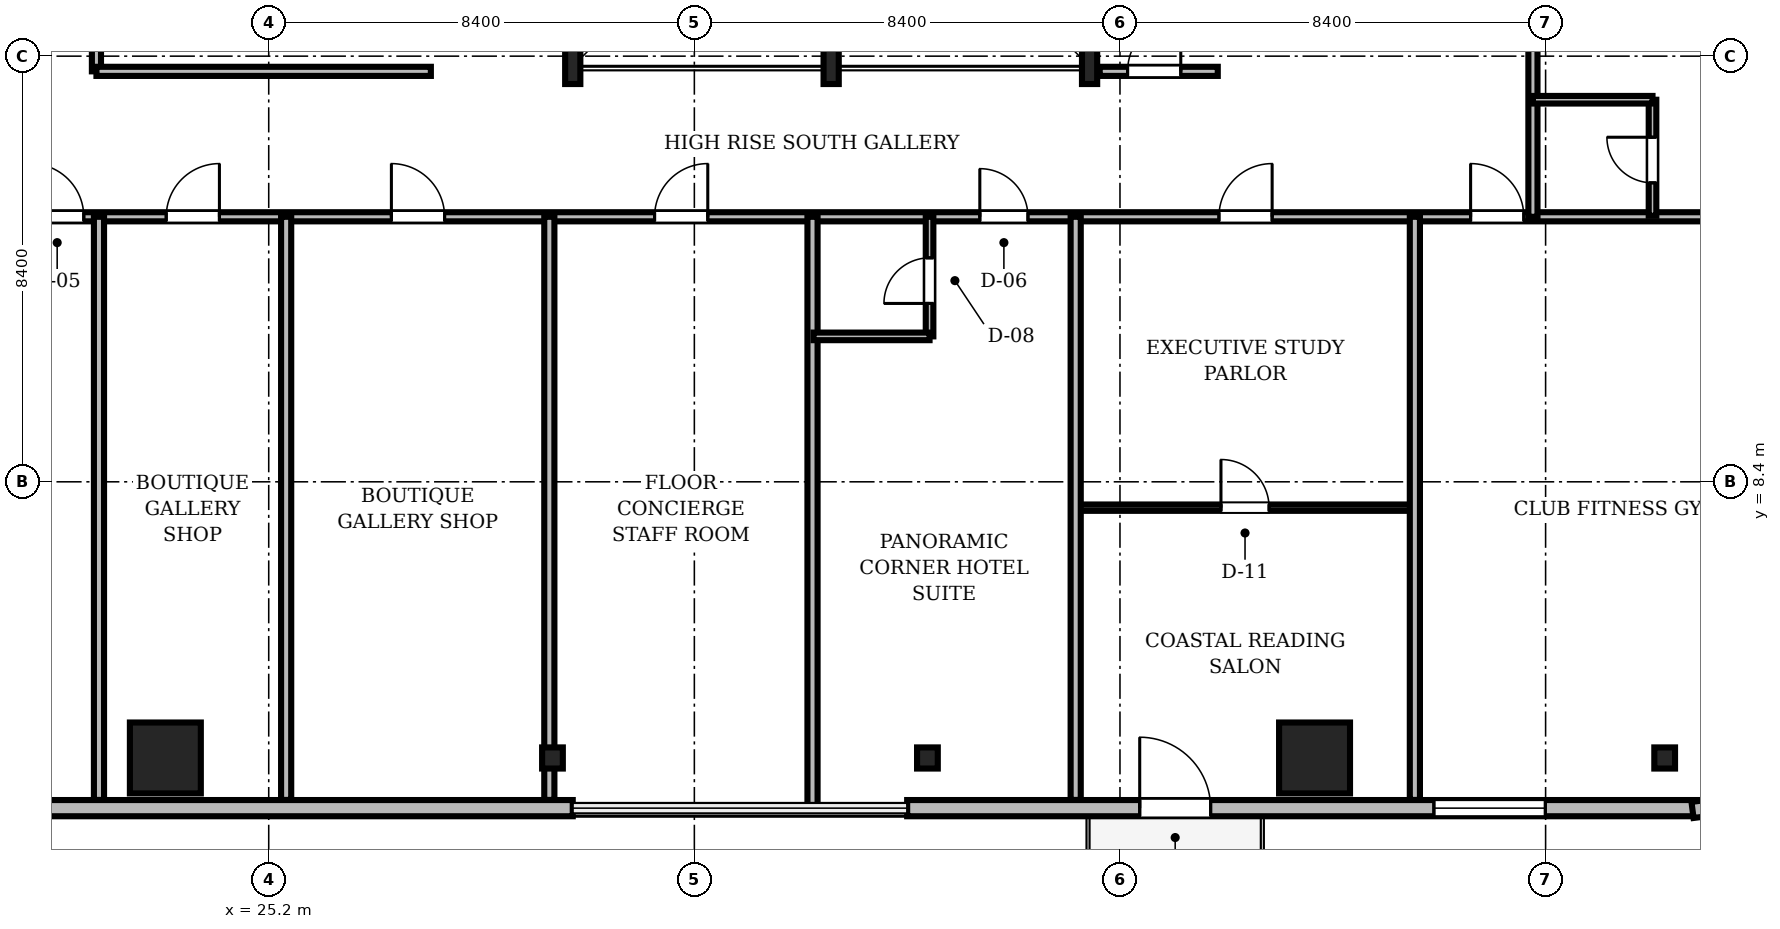
"""IFC4 building model, lengths in metres.
Left out: names, types, materials, properties, quantities, classifications, styles, units other than length and angle.
Written with IfcOpenShell. Run it as: python <this file> out.ifc"""

import sys

from ifc_helpers import new_model, si_unit, direction, frame, frame_2d, origin, origin_2d, place, context, subcontext, project, spatial, rectangle, i_section, extrude, source, transform, mapped, element, fill, save


model = new_model("IFC4")
c1 = context("Model", 3, precision=1e-05, world=origin(), true_north=direction((0.0, 1.0)))
c2 = subcontext(c1, "Body", "Model", "MODEL_VIEW")
j1 = project(units=[si_unit("LENGTHUNIT", "METRE"), si_unit("PLANEANGLEUNIT", "RADIAN")], contexts=[c1])
p1 = place(None, origin())
s1 = spatial("IfcSite", under=j1, at=p1, CompositionType="ELEMENT")
p2 = place(p1, origin())
s2 = spatial("IfcBuilding", under=s1, at=p2, CompositionType="ELEMENT")
p3 = place(p2, frame((0.0, 0.0, 199.8)))
s3 = spatial("IfcBuildingStorey", under=s2, at=p3, CompositionType="ELEMENT", Elevation=199.8)
m1 = source(origin(), c2, "Body", "SweptSolid", [
    extrude(i_section(OverallWidth=0.3, OverallDepth=0.7, WebThickness=0.017, FlangeThickness=0.032, FilletRadius=0.027, at=origin_2d()), origin(), (0.0, 0.0, 1.0), 3.53),
])
for number, where, z_axis, x_axis in (
    (1, (31.2, 16.6, 0.0), (0.0, 0.0, 1.0), (1.0, 0.0, 0.0)),
    (2, (36.3, 16.6, 0.0), (0.0, 0.0, 1.0), (1.0, 0.0, 0.0)),
    (3, (41.4, 16.6, 0.0), (0.0, 0.0, 1.0), (1.0, 0.0, 0.0)),
):
    element("IfcColumn", number, at=place(p3, frame(where, z_axis=z_axis, x_axis=x_axis)), inside=s3, PredefinedType="COLUMN", context=c2, shape_type="MappedRepresentation", body=[
        mapped(m1, transform((0.0, 0.0, 0.0), scale=1.0)),
    ])
m2 = source(origin(), c2, "Body", "SweptSolid", [
    extrude(rectangle(XDim=1.4, YDim=1.4, at=origin_2d()), origin(), (0.0, 0.0, 1.0), 3.53),
])
for number, where, z_axis, x_axis in (
    (4, (23.16, 2.95, 0.0), (0.0, 0.0, 1.0), (1.0, 0.0, 0.0)),
    (5, (45.84, 2.95, 0.0), (0.0, 0.0, 1.0), (1.0, 0.0, 0.0)),
):
    element("IfcColumn", number, at=place(p3, frame(where, z_axis=z_axis, x_axis=x_axis)), inside=s3, PredefinedType="COLUMN", context=c2, shape_type="MappedRepresentation", body=[
        mapped(m2, transform((0.0, 0.0, 0.0), scale=1.0)),
    ])
m3 = source(origin(), c2, "Body", "SweptSolid", [
    extrude(i_section(OverallWidth=0.409, OverallDepth=0.417, WebThickness=0.021, FlangeThickness=0.033, FilletRadius=0.015, at=origin_2d()), origin(), (0.0, 0.0, 1.0), 3.53),
])
for number, where, z_axis, x_axis in (
    (6, (30.8, 2.95, 0.0), (0.0, 0.0, 1.0), (1.0, 0.0, 0.0)),
    (7, (38.2, 2.95, 0.0), (0.0, 0.0, 1.0), (1.0, 0.0, 0.0)),
    (8, (52.75, 2.95, 0.0), (0.0, 0.0, 1.0), (1.0, 0.0, 0.0)),
):
    element("IfcColumn", number, at=place(p3, frame(where, z_axis=z_axis, x_axis=x_axis)), inside=s3, PredefinedType="COLUMN", context=c2, shape_type="MappedRepresentation", body=[
        mapped(m3, transform((0.0, 0.0, 0.0), scale=1.0)),
    ])
m4 = source(origin(), c2, "Body", "SweptSolid", [
    extrude(rectangle(XDim=15.6, YDim=0.32, at=frame_2d((7.8, 0.0))), origin(), (0.0, 0.0, 1.0), 3.53),
])
p4 = place(p3, frame((15.6, 1.96, 0.0), z_axis=(0.0, 0.0, 1.0), x_axis=(1.0, 0.0, 0.0)))
e9 = element("IfcWall", 9, at=p4, inside=s3, PredefinedType="SOLIDWALL", context=c2, shape_type="MappedRepresentation", body=[
    mapped(m4, transform((0.0, 0.0, 0.0), scale=1.0)),
])
m5 = source(origin(), c2, "Body", "SweptSolid", [
    extrude(rectangle(XDim=2.2, YDim=2.4, at=frame_2d((1.1, 1.2))), frame((0.0, 0.17, 0.0), z_axis=(0.0, -1.0, 0.0), x_axis=(1.0, 0.0, 0.0)), (0.0, 0.0, 1.0), 0.34),
])
p5 = place(p4, frame((3.005, 0.0, 0.72)))
e10 = element("IfcOpeningElement", 10, at=p5, cuts=e9, PredefinedType="OPENING", context=c2, shape_type="MappedRepresentation", body=[
    mapped(m5, transform((0.0, 0.0, 0.0), scale=1.0)),
])
p6 = place(p3, frame((37.8, 1.96, 0.0), z_axis=(0.0, 0.0, 1.0), x_axis=(1.0, 0.0, 0.0)))
e11 = element("IfcWall", 11, at=p6, inside=s3, PredefinedType="SOLIDWALL", context=c2, shape_type="MappedRepresentation", body=[
    mapped(m4, transform((0.0, 0.0, 0.0), scale=1.0)),
])
m6 = source(origin(), c2, "Body", "SweptSolid", [
    extrude(rectangle(XDim=1.4, YDim=2.3, at=frame_2d((0.7, 1.15))), frame((0.0, 0.17, 0.0), z_axis=(0.0, -1.0, 0.0), x_axis=(1.0, 0.0, 0.0)), (0.0, 0.0, 1.0), 0.34),
])
p7 = place(p6, frame((4.59, 0.0, 0.0)))
e12 = element("IfcOpeningElement", 12, at=p7, cuts=e11, PredefinedType="OPENING", context=c2, shape_type="MappedRepresentation", body=[
    mapped(m6, transform((0.0, 0.0, 0.0), scale=1.0)),
])
p8 = place(p6, frame((10.395, 0.0, 0.72)))
e13 = element("IfcOpeningElement", 13, at=p8, cuts=e11, PredefinedType="OPENING", context=c2, shape_type="MappedRepresentation", body=[
    mapped(m5, transform((0.0, 0.0, 0.0), scale=1.0)),
])
m7 = source(origin(), c2, "Body", "SweptSolid", [
    extrude(rectangle(XDim=1.17, YDim=0.32, at=frame_2d((0.585, 0.0))), origin(), (0.0, 0.0, 1.0), 3.53),
])
p9 = place(p3, frame((53.3, 1.925, 0.0), z_axis=(0.0, 0.0, 1.0), x_axis=(0.991762485493, 0.128090485085, 0.0)))
e14 = element("IfcWall", 14, at=p9, inside=s3, PredefinedType="SOLIDWALL", context=c2, shape_type="MappedRepresentation", body=[
    mapped(m7, transform((0.0, 0.0, 0.0), scale=1.0)),
])
m8 = source(origin(), c2, "Body", "SweptSolid", [
    extrude(rectangle(XDim=46.156, YDim=0.18, at=frame_2d((23.078, 0.0))), origin(), (0.0, 0.0, 1.0), 2.772),
])
p10 = place(p3, frame((11.422, 13.63, 0.0), z_axis=(0.0, 0.0, 1.0), x_axis=(1.0, 0.0, 0.0)))
e15 = element("IfcWall", 15, at=p10, inside=s3, PredefinedType="PARTITIONING", context=c2, shape_type="MappedRepresentation", body=[
    mapped(m8, transform((0.0, 0.0, 0.0), scale=1.0)),
])
m9 = source(origin(), c2, "Body", "SweptSolid", [
    extrude(rectangle(XDim=1.05, YDim=2.2, at=frame_2d((0.525, 1.1))), frame((0.0, 0.1, 0.0), z_axis=(0.0, -1.0, 0.0), x_axis=(1.0, 0.0, 0.0)), (0.0, 0.0, 1.0), 0.2),
])
p11 = place(p10, frame((9.078, 0.0, 0.0)))
e16 = element("IfcOpeningElement", 16, at=p11, cuts=e15, PredefinedType="OPENING", context=c2, shape_type="MappedRepresentation", body=[
    mapped(m9, transform((0.0, 0.0, 0.0), scale=1.0)),
])
p12 = place(p10, frame((11.755, 0.0, 0.0)))
e17 = element("IfcOpeningElement", 17, at=p12, cuts=e15, PredefinedType="OPENING", context=c2, shape_type="MappedRepresentation", body=[
    mapped(m9, transform((0.0, 0.0, 0.0), scale=1.0)),
])
p13 = place(p10, frame((16.199, 0.0, 0.0)))
e18 = element("IfcOpeningElement", 18, at=p13, cuts=e15, PredefinedType="OPENING", context=c2, shape_type="MappedRepresentation", body=[
    mapped(m9, transform((0.0, 0.0, 0.0), scale=1.0)),
])
p14 = place(p10, frame((21.393, 0.0, 0.0)))
e19 = element("IfcOpeningElement", 19, at=p14, cuts=e15, PredefinedType="OPENING", context=c2, shape_type="MappedRepresentation", body=[
    mapped(m9, transform((0.0, 0.0, 0.0), scale=1.0)),
])
m10 = source(origin(), c2, "Body", "SweptSolid", [
    extrude(rectangle(XDim=0.95, YDim=2.15, at=frame_2d((0.475, 1.075))), frame((0.0, 0.1, 0.0), z_axis=(0.0, -1.0, 0.0), x_axis=(1.0, 0.0, 0.0)), (0.0, 0.0, 1.0), 0.2),
])
p15 = place(p10, frame((27.812, 0.0, 0.0)))
e20 = element("IfcOpeningElement", 20, at=p15, cuts=e15, PredefinedType="OPENING", context=c2, shape_type="MappedRepresentation", body=[
    mapped(m10, transform((0.0, 0.0, 0.0), scale=1.0)),
])
p16 = place(p10, frame((32.531, 0.0, 0.0)))
e21 = element("IfcOpeningElement", 21, at=p16, cuts=e15, PredefinedType="OPENING", context=c2, shape_type="MappedRepresentation", body=[
    mapped(m9, transform((0.0, 0.0, 0.0), scale=1.0)),
])
p17 = place(p10, frame((37.498, 0.0, 0.0)))
e22 = element("IfcOpeningElement", 22, at=p17, cuts=e15, PredefinedType="OPENING", context=c2, shape_type="MappedRepresentation", body=[
    mapped(m9, transform((0.0, 0.0, 0.0), scale=1.0)),
])
m11 = source(origin(), c2, "Body", "SweptSolid", [
    extrude(rectangle(XDim=27.47, YDim=0.18, at=frame_2d((13.735, 0.0))), origin(), (0.0, 0.0, 1.0), 2.972),
])
p18 = place(p3, frame((50.15, 13.63, 0.0), z_axis=(0.0, 0.0, 1.0), x_axis=(0.0, 1.0, 0.0)))
e23 = element("IfcWall", 23, at=p18, inside=s3, PredefinedType="PARTITIONING", context=c2, shape_type="MappedRepresentation", body=[
    mapped(m11, transform((0.0, 0.0, 0.0), scale=1.0)),
])
p19 = place(p18, frame((4.071, 0.0, 0.0)))
e24 = element("IfcOpeningElement", 24, at=p19, cuts=e23, PredefinedType="OPENING", context=c2, shape_type="MappedRepresentation", body=[
    mapped(m9, transform((0.0, 0.0, 0.0), scale=1.0)),
])
p20 = place(p18, frame((10.884, 0.0, 0.0)))
e25 = element("IfcOpeningElement", 25, at=p20, cuts=e23, PredefinedType="OPENING", context=c2, shape_type="MappedRepresentation", body=[
    mapped(m9, transform((0.0, 0.0, 0.0), scale=1.0)),
])
p21 = place(p18, frame((17.696, 0.0, 0.0)))
e26 = element("IfcOpeningElement", 26, at=p21, cuts=e23, PredefinedType="OPENING", context=c2, shape_type="MappedRepresentation", body=[
    mapped(m9, transform((0.0, 0.0, 0.0), scale=1.0)),
])
p22 = place(p18, frame((24.509, 0.0, 0.0)))
e27 = element("IfcOpeningElement", 27, at=p22, cuts=e23, PredefinedType="OPENING", context=c2, shape_type="MappedRepresentation", body=[
    mapped(m9, transform((0.0, 0.0, 0.0), scale=1.0)),
])
m12 = source(origin(), c2, "Body", "SweptSolid", [
    extrude(rectangle(XDim=11.94, YDim=0.18, at=frame_2d((5.97, 0.0))), origin(), (0.0, 0.0, 1.0), 2.972),
])
p23 = place(p3, frame((21.8, 16.5, 0.0), z_axis=(0.0, 0.0, 1.0), x_axis=(0.0, 1.0, 0.0)))
e28 = element("IfcWall", 28, at=p23, inside=s3, PredefinedType="PARTITIONING", context=c2, shape_type="MappedRepresentation", body=[
    mapped(m12, transform((0.0, 0.0, 0.0), scale=1.0)),
])
p24 = place(p23, frame((4.5, 0.0, 0.0)))
e29 = element("IfcOpeningElement", 29, at=p24, cuts=e28, PredefinedType="OPENING", context=c2, shape_type="MappedRepresentation", body=[
    mapped(m9, transform((0.0, 0.0, 0.0), scale=1.0)),
])
m13 = source(origin(), c2, "Body", "SweptSolid", [
    extrude(rectangle(XDim=6.694, YDim=0.125, at=frame_2d((3.347, 0.0))), origin(), (0.0, 0.0, 1.0), 2.972),
])
p25 = place(p3, frame((41.126, 7.89, 0.0), z_axis=(0.0, 0.0, 1.0), x_axis=(1.0, 0.0, 0.0)))
e30 = element("IfcWall", 30, at=p25, inside=s3, PredefinedType="PARTITIONING", context=c2, shape_type="MappedRepresentation", body=[
    mapped(m13, transform((0.0, 0.0, 0.0), scale=1.0)),
])
m14 = source(origin(), c2, "Body", "SweptSolid", [
    extrude(rectangle(XDim=0.95, YDim=2.15, at=frame_2d((0.475, 1.075))), frame((0.0, 0.073, 0.0), z_axis=(0.0, -1.0, 0.0), x_axis=(1.0, 0.0, 0.0)), (0.0, 0.0, 1.0), 0.145),
])
p26 = place(p25, frame((2.867, 0.0, 0.0)))
e31 = element("IfcOpeningElement", 31, at=p26, cuts=e30, PredefinedType="OPENING", context=c2, shape_type="MappedRepresentation", body=[
    mapped(m14, transform((0.0, 0.0, 0.0), scale=1.0)),
])
m15 = source(origin(), c2, "Body", "SweptSolid", [
    extrude(rectangle(XDim=2.36, YDim=0.15, at=frame_2d((1.18, 0.0))), origin(), (0.0, 0.0, 1.0), 3.192),
])
p27 = place(p3, frame((38.242, 11.27, 0.0), z_axis=(0.0, 0.0, 1.0), x_axis=(0.0, 1.0, 0.0)))
e32 = element("IfcWall", 32, at=p27, inside=s3, PredefinedType="PARTITIONING", context=c2, shape_type="MappedRepresentation", body=[
    mapped(m15, transform((0.0, 0.0, 0.0), scale=1.0)),
])
m16 = source(origin(), c2, "Body", "SweptSolid", [
    extrude(rectangle(XDim=0.9, YDim=2.1, at=frame_2d((0.45, 1.05))), frame((0.0, 0.085, 0.0), z_axis=(0.0, -1.0, 0.0), x_axis=(1.0, 0.0, 0.0)), (0.0, 0.0, 1.0), 0.17),
])
p28 = place(p27, frame((0.65, 0.0, 0.0)))
e33 = element("IfcOpeningElement", 33, at=p28, cuts=e32, PredefinedType="OPENING", context=c2, shape_type="MappedRepresentation", body=[
    mapped(m16, transform((0.0, 0.0, 0.0), scale=1.0)),
])
m17 = source(origin(), c2, "Body", "SweptSolid", [
    extrude(rectangle(XDim=2.33, YDim=0.18, at=frame_2d((1.165, 0.0))), origin(), (0.0, 0.0, 1.0), 2.972),
])
p29 = place(p3, frame((41.6, 16.5, 0.0), z_axis=(0.0, 0.0, 1.0), x_axis=(1.0, 0.0, 0.0)))
e34 = element("IfcWall", 34, at=p29, inside=s3, PredefinedType="PARTITIONING", context=c2, shape_type="MappedRepresentation", body=[
    mapped(m17, transform((0.0, 0.0, 0.0), scale=1.0)),
])
p30 = place(p29, frame((0.55, 0.0, 0.0)))
e35 = element("IfcOpeningElement", 35, at=p30, cuts=e34, PredefinedType="OPENING", context=c2, shape_type="MappedRepresentation", body=[
    mapped(m9, transform((0.0, 0.0, 0.0), scale=1.0)),
])
m18 = source(origin(), c2, "Body", "SweptSolid", [
    extrude(rectangle(XDim=2.29, YDim=0.15, at=frame_2d((1.145, 0.0))), origin(), (0.0, 0.0, 1.0), 2.972),
])
p31 = place(p3, frame((52.51, 13.65, 0.0), z_axis=(0.0, 0.0, 1.0), x_axis=(0.0, 1.0, 0.0)))
e36 = element("IfcWall", 36, at=p31, inside=s3, PredefinedType="PARTITIONING", context=c2, shape_type="MappedRepresentation", body=[
    mapped(m18, transform((0.0, 0.0, 0.0), scale=1.0)),
])
p32 = place(p31, frame((0.65, 0.0, 0.0)))
e37 = element("IfcOpeningElement", 37, at=p32, cuts=e36, PredefinedType="OPENING", context=c2, shape_type="MappedRepresentation", body=[
    mapped(m16, transform((0.0, 0.0, 0.0), scale=1.0)),
])
m19 = source(origin(), c2, "Body", "SweptSolid", [
    extrude(rectangle(XDim=11.508, YDim=0.2, at=frame_2d((5.754, 0.0))), origin(), (0.0, 0.0, 1.0), 2.772),
])
for number, where, z_axis, x_axis in (
    (38, (21.85, 2.122, 0.0), (0.0, 0.0, 1.0), (0.0, 1.0, 0.0)),
    (39, (25.544, 2.122, 0.0), (0.0, 0.0, 1.0), (0.0, 1.0, 0.0)),
    (40, (30.738, 2.122, 0.0), (0.0, 0.0, 1.0), (0.0, 1.0, 0.0)),
):
    element("IfcWall", number, at=place(p3, frame(where, z_axis=z_axis, x_axis=x_axis)), inside=s3, PredefinedType="PARTITIONING", context=c2, shape_type="MappedRepresentation", body=[
        mapped(m19, transform((0.0, 0.0, 0.0), scale=1.0)),
    ])
m20 = source(origin(), c2, "Body", "SweptSolid", [
    extrude(rectangle(XDim=11.7, YDim=0.2, at=frame_2d((5.85, 0.0))), origin(), (0.0, 0.0, 1.0), 2.772),
])
p33 = place(p3, frame((35.932, 1.93, 0.0), z_axis=(0.0, 0.0, 1.0), x_axis=(0.0, 1.0, 0.0)))
e41 = element("IfcWall", 41, at=p33, inside=s3, PredefinedType="PARTITIONING", context=c2, shape_type="MappedRepresentation", body=[
    mapped(m20, transform((0.0, 0.0, 0.0), scale=1.0)),
])
for number, where, z_axis, x_axis in (
    (42, (41.126, 2.122, 0.0), (0.0, 0.0, 1.0), (0.0, 1.0, 0.0)),
    (43, (47.82, 2.122, 0.0), (0.0, 0.0, 1.0), (0.0, 1.0, 0.0)),
):
    element("IfcWall", number, at=place(p3, frame(where, z_axis=z_axis, x_axis=x_axis)), inside=s3, PredefinedType="PARTITIONING", context=c2, shape_type="MappedRepresentation", body=[
        mapped(m19, transform((0.0, 0.0, 0.0), scale=1.0)),
    ])
m21 = source(origin(), c2, "Body", "SweptSolid", [
    extrude(rectangle(XDim=6.6, YDim=0.18, at=frame_2d((3.3, 0.0))), origin(), (0.0, 0.0, 1.0), 3.53),
])
p34 = place(p3, frame((21.8, 16.5, 0.0), z_axis=(0.0, 0.0, 1.0), x_axis=(1.0, 0.0, 0.0)))
e44 = element("IfcWall", 44, at=p34, inside=s3, PredefinedType="PARTITIONING", context=c2, shape_type="MappedRepresentation", body=[
    mapped(m21, transform((0.0, 0.0, 0.0), scale=1.0)),
])
m22 = source(origin(), c2, "Body", "SweptSolid", [
    extrude(rectangle(XDim=2.36, YDim=0.15, at=frame_2d((1.18, 0.0))), origin(), (0.0, 0.0, 1.0), 3.53),
])
p35 = place(p3, frame((50.15, 15.94, 0.0), z_axis=(0.0, 0.0, 1.0), x_axis=(1.0, 0.0, 0.0)))
e45 = element("IfcWall", 45, at=p35, inside=s3, PredefinedType="PARTITIONING", context=c2, shape_type="MappedRepresentation", body=[
    mapped(m22, transform((0.0, 0.0, 0.0), scale=1.0)),
])
p36 = place(p3, frame((35.952, 11.27, 0.0), z_axis=(0.0, 0.0, 1.0), x_axis=(1.0, 0.0, 0.0)))
e46 = element("IfcWall", 46, at=p36, inside=s3, PredefinedType="PARTITIONING", context=c2, shape_type="MappedRepresentation", body=[
    mapped(m18, transform((0.0, 0.0, 0.0), scale=1.0)),
])
m23 = source(origin(), c2, "Body", "SweptSolid", [
    extrude(rectangle(XDim=1.4, YDim=2.3, at=frame_2d((0.7, 1.15))), frame((0.0, 0.025, 0.0), z_axis=(0.0, -1.0, 0.0), x_axis=(1.0, 0.0, 0.0)), (0.0, 0.0, 1.0), 0.05),
])
p37 = place(p7, frame((1.4, 0.0, 0.0), z_axis=(0.0, 0.0, 1.0), x_axis=(-1.0, 0.0, 0.0)))
e47 = element("IfcDoor", 47, at=p37, inside=s3, OperationType="DOUBLE_DOOR_SLIDING", PredefinedType="DOOR", context=c2, shape_type="MappedRepresentation", body=[
    mapped(m23, transform((0.0, 0.0, 0.0), scale=1.0)),
])
fill(e12, e47)
m24 = source(origin(), c2, "Body", "SweptSolid", [
    extrude(rectangle(XDim=2.2, YDim=2.4, at=frame_2d((1.1, 1.2))), frame((0.0, 0.03, 0.0), z_axis=(0.0, -1.0, 0.0), x_axis=(1.0, 0.0, 0.0)), (0.0, 0.0, 1.0), 0.06),
])
p38 = place(p8, origin())
e48 = element("IfcWindow", 48, at=p38, inside=s3, PartitioningType="SINGLE_PANEL", PredefinedType="WINDOW", context=c2, shape_type="MappedRepresentation", body=[
    mapped(m24, transform((0.0, 0.0, 0.0), scale=1.0)),
])
fill(e13, e48)
m25 = source(origin(), c2, "Body", "SweptSolid", [
    extrude(rectangle(XDim=1.05, YDim=2.2, at=frame_2d((0.525, 1.1))), frame((0.0, 0.025, 0.0), z_axis=(0.0, -1.0, 0.0), x_axis=(1.0, 0.0, 0.0)), (0.0, 0.0, 1.0), 0.05),
])
p39 = place(p11, origin())
e49 = element("IfcDoor", 49, at=p39, inside=s3, OperationType="SINGLE_SWING_LEFT", PredefinedType="DOOR", context=c2, shape_type="MappedRepresentation", body=[
    mapped(m25, transform((0.0, 0.0, 0.0), scale=1.0)),
])
fill(e16, e49)
p40 = place(p12, origin())
e50 = element("IfcDoor", 50, at=p40, inside=s3, OperationType="SINGLE_SWING_RIGHT", PredefinedType="DOOR", context=c2, shape_type="MappedRepresentation", body=[
    mapped(m25, transform((0.0, 0.0, 0.0), scale=1.0)),
])
fill(e17, e50)
p41 = place(p13, origin())
e51 = element("IfcDoor", 51, at=p41, inside=s3, OperationType="SINGLE_SWING_LEFT", PredefinedType="DOOR", context=c2, shape_type="MappedRepresentation", body=[
    mapped(m25, transform((0.0, 0.0, 0.0), scale=1.0)),
])
fill(e18, e51)
p42 = place(p14, origin())
e52 = element("IfcDoor", 52, at=p42, inside=s3, OperationType="SINGLE_SWING_RIGHT", PredefinedType="DOOR", context=c2, shape_type="MappedRepresentation", body=[
    mapped(m25, transform((0.0, 0.0, 0.0), scale=1.0)),
])
fill(e19, e52)
m26 = source(origin(), c2, "Body", "SweptSolid", [
    extrude(rectangle(XDim=0.95, YDim=2.15, at=frame_2d((0.475, 1.075))), frame((0.0, 0.025, 0.0), z_axis=(0.0, -1.0, 0.0), x_axis=(1.0, 0.0, 0.0)), (0.0, 0.0, 1.0), 0.05),
])
p43 = place(p15, origin())
e53 = element("IfcDoor", 53, at=p43, inside=s3, OperationType="SINGLE_SWING_LEFT", PredefinedType="DOOR", context=c2, shape_type="MappedRepresentation", body=[
    mapped(m26, transform((0.0, 0.0, 0.0), scale=1.0)),
])
fill(e20, e53)
p44 = place(p16, origin())
e54 = element("IfcDoor", 54, at=p44, inside=s3, OperationType="SINGLE_SWING_RIGHT", PredefinedType="DOOR", context=c2, shape_type="MappedRepresentation", body=[
    mapped(m25, transform((0.0, 0.0, 0.0), scale=1.0)),
])
fill(e21, e54)
p45 = place(p17, origin())
e55 = element("IfcDoor", 55, at=p45, inside=s3, OperationType="SINGLE_SWING_LEFT", PredefinedType="DOOR", context=c2, shape_type="MappedRepresentation", body=[
    mapped(m25, transform((0.0, 0.0, 0.0), scale=1.0)),
])
fill(e22, e55)
p46 = place(p26, origin())
e56 = element("IfcDoor", 56, at=p46, inside=s3, OperationType="SINGLE_SWING_LEFT", PredefinedType="DOOR", context=c2, shape_type="MappedRepresentation", body=[
    mapped(m26, transform((0.0, 0.0, 0.0), scale=1.0)),
])
fill(e31, e56)
m27 = source(origin(), c2, "Body", "SweptSolid", [
    extrude(rectangle(XDim=0.9, YDim=2.1, at=frame_2d((0.45, 1.05))), frame((0.0, 0.025, 0.0), z_axis=(0.0, -1.0, 0.0), x_axis=(1.0, 0.0, 0.0)), (0.0, 0.0, 1.0), 0.05),
])
p47 = place(p28, origin())
e57 = element("IfcDoor", 57, at=p47, inside=s3, OperationType="SINGLE_SWING_LEFT", PredefinedType="DOOR", context=c2, shape_type="MappedRepresentation", body=[
    mapped(m27, transform((0.0, 0.0, 0.0), scale=1.0)),
])
fill(e33, e57)
p48 = place(p30, origin())
e58 = element("IfcDoor", 58, at=p48, inside=s3, OperationType="SINGLE_SWING_RIGHT", PredefinedType="DOOR", context=c2, shape_type="MappedRepresentation", body=[
    mapped(m25, transform((0.0, 0.0, 0.0), scale=1.0)),
])
fill(e35, e58)
p49 = place(p32, origin())
e59 = element("IfcDoor", 59, at=p49, inside=s3, OperationType="SINGLE_SWING_RIGHT", PredefinedType="DOOR", context=c2, shape_type="MappedRepresentation", body=[
    mapped(m27, transform((0.0, 0.0, 0.0), scale=1.0)),
])
fill(e37, e59)
save(model, sys.argv[1])
